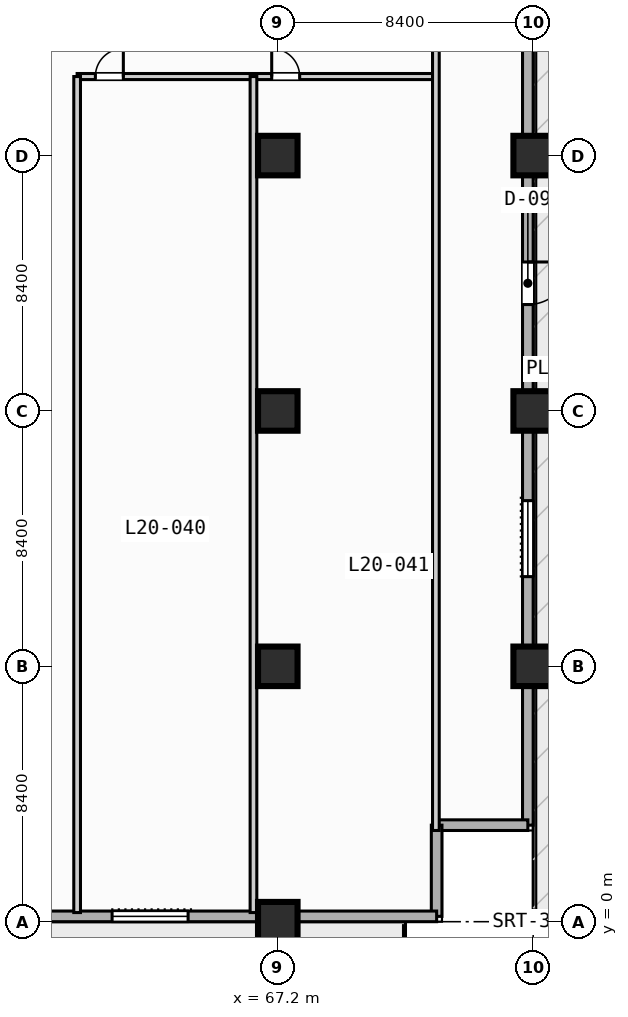
"""IFC4 building model, lengths in metres.
Left out: names, types, materials, properties, quantities, classifications, styles, units other than length and angle.
Written with IfcOpenShell. Run it as: python <this file> out.ifc"""

import sys

from ifc_helpers import new_model, si_unit, direction, frame, frame_2d, origin, origin_2d, place, context, subcontext, project, spatial, rectangle, extrude, element, fill, save


model = new_model("IFC4")
c1 = context("Model", 3, precision=1e-05, world=origin(), true_north=direction((0.0, 1.0)))
c2 = subcontext(c1, "Body", "Model", "MODEL_VIEW")
j1 = project(units=[si_unit("LENGTHUNIT", "METRE"), si_unit("PLANEANGLEUNIT", "RADIAN")], contexts=[c1])
p1 = place(None, origin())
s1 = spatial("IfcSite", under=j1, at=p1, CompositionType="ELEMENT")
p2 = place(p1, origin())
s2 = spatial("IfcBuilding", under=s1, at=p2, CompositionType="ELEMENT")
p3 = place(p2, frame((0.0, 0.0, 85.2)))
s3 = spatial("IfcBuildingStorey", under=s2, at=p3, CompositionType="ELEMENT", Elevation=85.2)
for number, where, z_axis, x_axis in (
    (1, (67.2, 0.0, 0.0), (0.0, 0.0, 1.0), (1.0, 0.0, 0.0)),
    (2, (67.2, 8.4, 0.0), (0.0, 0.0, 1.0), (1.0, 0.0, 0.0)),
    (3, (67.2, 16.8, 0.0), (0.0, 0.0, 1.0), (1.0, 0.0, 0.0)),
    (4, (67.2, 25.2, 0.0), (0.0, 0.0, 1.0), (1.0, 0.0, 0.0)),
    (5, (75.6, 8.4, 0.0), (0.0, 0.0, 1.0), (1.0, 0.0, 0.0)),
    (6, (75.6, 16.8, 0.0), (0.0, 0.0, 1.0), (1.0, 0.0, 0.0)),
    (7, (75.6, 25.2, 0.0), (0.0, 0.0, 1.0), (1.0, 0.0, 0.0)),
):
    element("IfcColumn", number, at=place(p3, frame(where, z_axis=z_axis, x_axis=x_axis)), inside=s3, PredefinedType="COLUMN", context=c2, shape_type="SweptSolid", body=[
        extrude(rectangle(XDim=1.3, YDim=1.3, at=origin_2d()), origin(), (0.0, 0.0, 1.0), 4.4),
    ])
p4 = place(p3, frame((75.425, 30.425, 0.0), z_axis=(0.0, 0.0, 1.0), x_axis=(0.0, -1.0, 0.0)))
e8 = element("IfcWall", 8, at=p4, inside=s3, PredefinedType="STANDARD", context=c2, shape_type="SweptSolid", body=[
    extrude(rectangle(XDim=27.25, YDim=0.35, at=frame_2d((13.625, 0.0))), origin(), (0.0, 0.0, 1.0), 4.15),
])
p5 = place(p4, frame((8.725, 0.0, 0.0)))
e9 = element("IfcOpeningElement", 9, at=p5, cuts=e8, PredefinedType="OPENING", context=c2, shape_type="SweptSolid", body=[
    extrude(rectangle(XDim=1.4, YDim=2.2, at=frame_2d((0.7, 1.1))), frame((0.0, 0.185, 0.0), z_axis=(0.0, -1.0, 0.0), x_axis=(1.0, 0.0, 0.0)), (0.0, 0.0, 1.0), 0.37),
])
p6 = place(p4, frame((16.575, 0.0, 0.85)))
e10 = element("IfcOpeningElement", 10, at=p6, cuts=e8, PredefinedType="OPENING", context=c2, shape_type="SweptSolid", body=[
    extrude(rectangle(XDim=2.5, YDim=2.2, at=frame_2d((1.25, 1.1))), frame((0.0, 0.185, 0.0), z_axis=(0.0, -1.0, 0.0), x_axis=(1.0, 0.0, 0.0)), (0.0, 0.0, 1.0), 0.37),
])
for number, where, z_axis, x_axis in (
    (11, (75.425, 3.175, 0.0), (0.0, 0.0, 1.0), (-1.0, 0.0, 0.0)),
    (12, (72.425, 3.175, 0.0), (0.0, 0.0, 1.0), (0.0, -1.0, 0.0)),
):
    element("IfcWall", number, at=place(p3, frame(where, z_axis=z_axis, x_axis=x_axis)), inside=s3, PredefinedType="STANDARD", context=c2, shape_type="SweptSolid", body=[
        extrude(rectangle(XDim=3.0, YDim=0.35, at=frame_2d((1.5, 0.0))), origin(), (0.0, 0.0, 1.0), 4.15),
    ])
p7 = place(p3, frame((72.425, 0.175, 0.0), z_axis=(0.0, 0.0, 1.0), x_axis=(-1.0, 0.0, 0.0)))
e13 = element("IfcWall", 13, at=p7, inside=s3, PredefinedType="STANDARD", context=c2, shape_type="SweptSolid", body=[
    extrude(rectangle(XDim=69.25, YDim=0.35, at=frame_2d((34.625, 0.0))), origin(), (0.0, 0.0, 1.0), 4.15),
])
p8 = place(p7, frame((50.725, 0.0, 0.0)))
e14 = element("IfcOpeningElement", 14, at=p8, cuts=e13, PredefinedType="OPENING", context=c2, shape_type="SweptSolid", body=[
    extrude(rectangle(XDim=1.4, YDim=2.2, at=frame_2d((0.7, 1.1))), frame((0.0, 0.185, 0.0), z_axis=(0.0, -1.0, 0.0), x_axis=(1.0, 0.0, 0.0)), (0.0, 0.0, 1.0), 0.37),
])
p9 = place(p7, frame((8.175, 0.0, 0.85)))
e15 = element("IfcOpeningElement", 15, at=p9, cuts=e13, PredefinedType="OPENING", context=c2, shape_type="SweptSolid", body=[
    extrude(rectangle(XDim=2.5, YDim=2.2, at=frame_2d((1.25, 1.1))), frame((0.0, 0.185, 0.0), z_axis=(0.0, -1.0, 0.0), x_axis=(1.0, 0.0, 0.0)), (0.0, 0.0, 1.0), 0.37),
])
p10 = place(p3, frame((60.6, 27.8, 0.0), z_axis=(0.0, 0.0, 1.0), x_axis=(1.0, 0.0, 0.0)))
e16 = element("IfcWall", 16, at=p10, inside=s3, PredefinedType="PARTITIONING", context=c2, shape_type="SweptSolid", body=[
    extrude(rectangle(XDim=11.8, YDim=0.2, at=frame_2d((5.9, 0.0))), origin(), (0.0, 0.0, 1.0), 4.15),
])
p11 = place(p10, frame((0.6, 0.0, 0.0)))
e17 = element("IfcOpeningElement", 17, at=p11, cuts=e16, PredefinedType="OPENING", context=c2, shape_type="SweptSolid", body=[
    extrude(rectangle(XDim=0.92, YDim=2.1, at=frame_2d((0.46, 1.05))), frame((0.0, 0.11, 0.0), z_axis=(0.0, -1.0, 0.0), x_axis=(1.0, 0.0, 0.0)), (0.0, 0.0, 1.0), 0.22),
])
p12 = place(p10, frame((6.4, 0.0, 0.0)))
e18 = element("IfcOpeningElement", 18, at=p12, cuts=e16, PredefinedType="OPENING", context=c2, shape_type="SweptSolid", body=[
    extrude(rectangle(XDim=0.92, YDim=2.1, at=frame_2d((0.46, 1.05))), frame((0.0, 0.11, 0.0), z_axis=(0.0, -1.0, 0.0), x_axis=(1.0, 0.0, 0.0)), (0.0, 0.0, 1.0), 0.22),
])
p13 = place(p3, frame((60.6, 0.3, 0.0), z_axis=(0.0, 0.0, 1.0), x_axis=(0.0, 1.0, 0.0)))
e19 = element("IfcWall", 19, at=p13, inside=s3, PredefinedType="PARTITIONING", context=c2, shape_type="SweptSolid", body=[
    extrude(rectangle(XDim=27.5, YDim=0.22, at=frame_2d((13.75, 0.0))), origin(), (0.0, 0.0, 1.0), 4.15),
])
p14 = place(p3, frame((72.4, 3.0, 0.0), z_axis=(0.0, 0.0, 1.0), x_axis=(0.0, 1.0, 0.0)))
e20 = element("IfcWall", 20, at=p14, inside=s3, PredefinedType="PARTITIONING", context=c2, shape_type="SweptSolid", body=[
    extrude(rectangle(XDim=27.4, YDim=0.22, at=frame_2d((13.7, 0.0))), origin(), (0.0, 0.0, 1.0), 4.15),
])
p15 = place(p3, frame((66.4, 0.3, 0.0), z_axis=(0.0, 0.0, 1.0), x_axis=(0.0, 1.0, 0.0)))
e21 = element("IfcWall", 21, at=p15, inside=s3, PredefinedType="PARTITIONING", context=c2, shape_type="SweptSolid", body=[
    extrude(rectangle(XDim=27.5, YDim=0.22, at=frame_2d((13.75, 0.0))), origin(), (0.0, 0.0, 1.0), 4.15),
])
p16 = place(p5, origin())
e22 = element("IfcDoor", 22, at=p16, inside=s3, OperationType="SINGLE_SWING_LEFT", PredefinedType="DOOR", context=c2, shape_type="SweptSolid", body=[
    extrude(rectangle(XDim=1.4, YDim=2.2, at=frame_2d((0.7, 1.1))), frame((0.0, 0.025, 0.0), z_axis=(0.0, -1.0, 0.0), x_axis=(1.0, 0.0, 0.0)), (0.0, 0.0, 1.0), 0.05),
])
fill(e9, e22)
p17 = place(p6, origin())
e23 = element("IfcWindow", 23, at=p17, inside=s3, PartitioningType="SINGLE_PANEL", PredefinedType="WINDOW", context=c2, shape_type="SweptSolid", body=[
    extrude(rectangle(XDim=2.5, YDim=2.2, at=frame_2d((1.25, 1.1))), frame((0.0, 0.03, 0.0), z_axis=(0.0, -1.0, 0.0), x_axis=(1.0, 0.0, 0.0)), (0.0, 0.0, 1.0), 0.06),
])
fill(e10, e23)
p18 = place(p9, origin())
e24 = element("IfcWindow", 24, at=p18, inside=s3, PartitioningType="SINGLE_PANEL", PredefinedType="WINDOW", context=c2, shape_type="SweptSolid", body=[
    extrude(rectangle(XDim=2.5, YDim=2.2, at=frame_2d((1.25, 1.1))), frame((0.0, 0.03, 0.0), z_axis=(0.0, -1.0, 0.0), x_axis=(1.0, 0.0, 0.0)), (0.0, 0.0, 1.0), 0.06),
])
fill(e15, e24)
p19 = place(p11, origin())
e25 = element("IfcDoor", 25, at=p19, inside=s3, OperationType="SINGLE_SWING_RIGHT", PredefinedType="DOOR", context=c2, shape_type="SweptSolid", body=[
    extrude(rectangle(XDim=0.92, YDim=2.1, at=frame_2d((0.46, 1.05))), frame((0.0, 0.025, 0.0), z_axis=(0.0, -1.0, 0.0), x_axis=(1.0, 0.0, 0.0)), (0.0, 0.0, 1.0), 0.05),
])
fill(e17, e25)
p20 = place(p12, origin())
e26 = element("IfcDoor", 26, at=p20, inside=s3, OperationType="SINGLE_SWING_LEFT", PredefinedType="DOOR", context=c2, shape_type="SweptSolid", body=[
    extrude(rectangle(XDim=0.92, YDim=2.1, at=frame_2d((0.46, 1.05))), frame((0.0, 0.025, 0.0), z_axis=(0.0, -1.0, 0.0), x_axis=(1.0, 0.0, 0.0)), (0.0, 0.0, 1.0), 0.05),
])
fill(e18, e26)
save(model, sys.argv[1])
